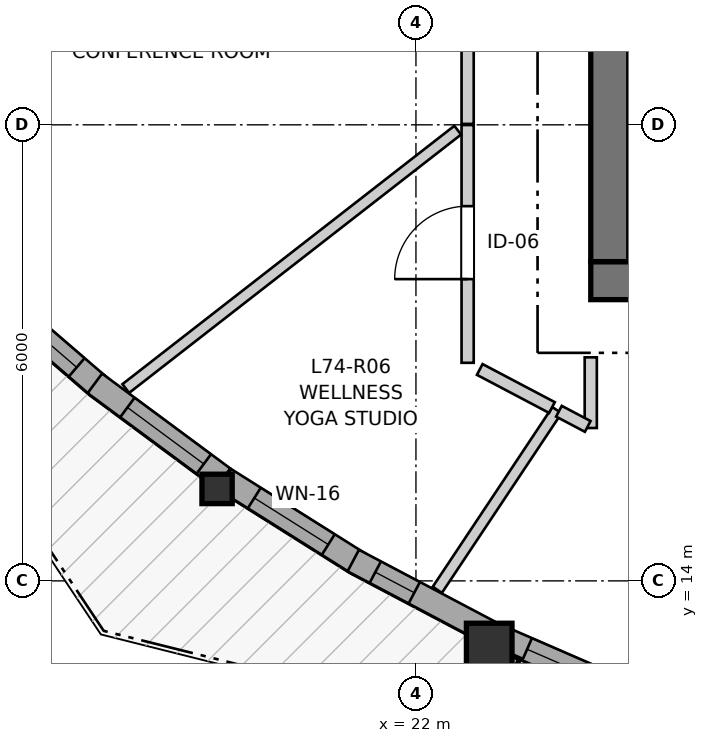
"""IFC4 building model, lengths in metres.
Left out: names, types, materials, properties, quantities, classifications, styles, units other than length and angle.
Written with IfcOpenShell. Run it as: python <this file> out.ifc"""

import sys

from ifc_helpers import new_model, si_unit, direction, frame, frame_2d, origin, origin_2d, place, context, subcontext, project, spatial, rectangle, i_section, extrude, source, transform, mapped, element, fill, save


model = new_model("IFC4")
c1 = context("Model", 3, precision=1e-05, world=origin(), true_north=direction((0.0, 1.0)))
c2 = subcontext(c1, "Body", "Model", "MODEL_VIEW")
j1 = project(units=[si_unit("LENGTHUNIT", "METRE"), si_unit("PLANEANGLEUNIT", "RADIAN")], contexts=[c1])
p1 = place(None, origin())
s1 = spatial("IfcSite", under=j1, at=p1, CompositionType="ELEMENT")
p2 = place(p1, origin())
s2 = spatial("IfcBuilding", under=s1, at=p2, CompositionType="ELEMENT")
p3 = place(p2, frame((0.0, 0.0, 246.8)))
s3 = spatial("IfcBuildingStorey", under=s2, at=p3, CompositionType="ELEMENT", Elevation=246.8)
p4 = place(p3, frame((24.3, 17.95, 0.0), z_axis=(0.0, 0.0, 1.0), x_axis=(1.0, 0.0, 0.0)))
e1 = element("IfcWall", 1, at=p4, inside=s3, PredefinedType="SHEAR", context=c2, shape_type="SweptSolid", body=[
    extrude(rectangle(XDim=12.1, YDim=0.5, at=frame_2d((6.05, 0.0))), origin(), (0.0, 0.0, 1.0), 2.96),
])
p5 = place(p3, frame((24.55, 33.8, 0.0), z_axis=(0.0, 0.0, 1.0), x_axis=(0.0, -1.0, 0.0)))
e2 = element("IfcWall", 2, at=p5, inside=s3, PredefinedType="SHEAR", context=c2, shape_type="SweptSolid", body=[
    extrude(rectangle(XDim=15.6, YDim=0.5, at=frame_2d((7.8, 0.0))), origin(), (0.0, 0.0, 1.0), 2.96),
])
p6 = place(p5, frame((7.05, 0.0, 0.0)))
e3 = element("IfcOpeningElement", 3, at=p6, cuts=e2, PredefinedType="OPENING", context=c2, shape_type="SweptSolid", body=[
    extrude(rectangle(XDim=1.5, YDim=2.15, at=frame_2d((0.75, 1.075))), frame((0.0, 0.26, 0.0), z_axis=(0.0, -1.0, 0.0), x_axis=(1.0, 0.0, 0.0)), (0.0, 0.0, 1.0), 0.52),
])
p7 = place(p5, frame((3.52, 0.0, 0.0)))
e4 = element("IfcOpeningElement", 4, at=p7, cuts=e2, PredefinedType="OPENING", context=c2, shape_type="SweptSolid", body=[
    extrude(rectangle(XDim=0.86, YDim=2.05, at=frame_2d((0.43, 1.025))), frame((0.0, 0.26, 0.0), z_axis=(0.0, -1.0, 0.0), x_axis=(1.0, 0.0, 0.0)), (0.0, 0.0, 1.0), 0.52),
])
p8 = place(p5, frame((11.22, 0.0, 0.0)))
e5 = element("IfcOpeningElement", 5, at=p8, cuts=e2, PredefinedType="OPENING", context=c2, shape_type="SweptSolid", body=[
    extrude(rectangle(XDim=0.86, YDim=2.05, at=frame_2d((0.43, 1.025))), frame((0.0, 0.26, 0.0), z_axis=(0.0, -1.0, 0.0), x_axis=(1.0, 0.0, 0.0)), (0.0, 0.0, 1.0), 0.52),
])
m1 = source(origin(), c2, "Body", "SweptSolid", [
    extrude(i_section(OverallWidth=0.398, OverallDepth=0.387, WebThickness=0.019, FlangeThickness=0.03, FilletRadius=0.015, at=origin_2d()), origin(), (0.0, 0.0, 1.0), 2.96),
])
p9 = place(p3, frame((19.383, 15.21, 0.0), z_axis=(0.0, 0.0, 1.0), x_axis=(1.0, 0.0, 0.0)))
e6 = element("IfcColumn", 6, at=p9, inside=s3, PredefinedType="PILASTER", context=c2, shape_type="MappedRepresentation", body=[
    mapped(m1, transform((0.0, 0.0, 0.0), x_axis=(1.0, 0.0, 0.0), y_axis=(0.0, 1.0, 0.0), z_axis=(0.0, 0.0, 1.0), scale=1.0)),
])
m2 = source(origin(), c2, "Body", "SweptSolid", [
    extrude(rectangle(XDim=0.6, YDim=0.6, at=origin_2d()), origin(), (0.0, 0.0, 1.0), 2.96),
])
p10 = place(p3, frame((22.964, 13.143, 0.0), z_axis=(0.0, 0.0, 1.0), x_axis=(1.0, 0.0, 0.0)))
e7 = element("IfcColumn", 7, at=p10, inside=s3, PredefinedType="COLUMN", context=c2, shape_type="MappedRepresentation", body=[
    mapped(m2, transform((0.0, 0.0, 0.0), x_axis=(1.0, 0.0, 0.0), y_axis=(0.0, 1.0, 0.0), z_axis=(0.0, 0.0, 1.0), scale=1.0)),
])
p11 = place(p3, frame((16.29, 17.884, 0.0), z_axis=(0.0, 0.0, 1.0), x_axis=(0.757405903716, -0.652944329186, 0.0)))
e8 = element("IfcWall", 8, at=p11, inside=s3, PredefinedType="SOLIDWALL", context=c2, shape_type="SweptSolid", body=[
    extrude(rectangle(XDim=2.052, YDim=0.32, at=frame_2d((1.026, 0.0))), origin(), (0.0, 0.0, 1.0), 2.58),
])
p12 = place(p11, frame((0.396, 0.0, 0.82)))
e9 = element("IfcOpeningElement", 9, at=p12, cuts=e8, PredefinedType="OPENING", context=c2, shape_type="SweptSolid", body=[
    extrude(rectangle(XDim=1.25, YDim=1.35, at=frame_2d((0.625, 0.675))), frame((0.0, 0.17, 0.0), z_axis=(0.0, -1.0, 0.0), x_axis=(1.0, 0.0, 0.0)), (0.0, 0.0, 1.0), 0.34),
])
p13 = place(p3, frame((17.775, 16.599, 0.0), z_axis=(0.0, 0.0, 1.0), x_axis=(0.803808524664, -0.594888103493, 0.0)))
e10 = element("IfcWall", 10, at=p13, inside=s3, PredefinedType="SOLIDWALL", context=c2, shape_type="SweptSolid", body=[
    extrude(rectangle(XDim=2.099, YDim=0.32, at=frame_2d((1.049, 0.0))), origin(), (0.0, 0.0, 1.0), 2.58),
])
p14 = place(p13, frame((0.533, 0.0, 0.82)))
e11 = element("IfcOpeningElement", 11, at=p14, cuts=e10, PredefinedType="OPENING", context=c2, shape_type="SweptSolid", body=[
    extrude(rectangle(XDim=1.25, YDim=1.35, at=frame_2d((0.625, 0.675))), frame((0.0, 0.17, 0.0), z_axis=(0.0, -1.0, 0.0), x_axis=(1.0, 0.0, 0.0)), (0.0, 0.0, 1.0), 0.34),
])
p15 = place(p3, frame((19.486, 15.335, 0.0), z_axis=(0.0, 0.0, 1.0), x_axis=(0.846377392327, -0.532583617621, 0.0)))
e12 = element("IfcWall", 12, at=p15, inside=s3, PredefinedType="SOLIDWALL", context=c2, shape_type="SweptSolid", body=[
    extrude(rectangle(XDim=2.087, YDim=0.32, at=frame_2d((1.043, 0.0))), origin(), (0.0, 0.0, 1.0), 2.58),
])
p16 = place(p15, frame((0.458, 0.0, 0.82)))
e13 = element("IfcOpeningElement", 13, at=p16, cuts=e12, PredefinedType="OPENING", context=c2, shape_type="SweptSolid", body=[
    extrude(rectangle(XDim=1.15, YDim=1.2, at=frame_2d((0.575, 0.6))), frame((0.0, 0.17, 0.0), z_axis=(0.0, -1.0, 0.0), x_axis=(1.0, 0.0, 0.0)), (0.0, 0.0, 1.0), 0.34),
])
p17 = place(p3, frame((21.175, 14.268, 0.0), z_axis=(0.0, 0.0, 1.0), x_axis=(0.88438197682, -0.466763879362, 0.0)))
e14 = element("IfcWall", 14, at=p17, inside=s3, PredefinedType="SOLIDWALL", context=c2, shape_type="SweptSolid", body=[
    extrude(rectangle(XDim=2.017, YDim=0.32, at=frame_2d((1.008, 0.0))), origin(), (0.0, 0.0, 1.0), 2.58),
])
p18 = place(p17, frame((0.327, 0.0, 0.82)))
e15 = element("IfcOpeningElement", 15, at=p18, cuts=e14, PredefinedType="OPENING", context=c2, shape_type="SweptSolid", body=[
    extrude(rectangle(XDim=0.58, YDim=1.35, at=frame_2d((0.29, 0.675))), frame((0.0, 0.17, 0.0), z_axis=(0.0, -1.0, 0.0), x_axis=(1.0, 0.0, 0.0)), (0.0, 0.0, 1.0), 0.34),
])
p19 = place(p3, frame((23.11, 13.254, 0.0), z_axis=(0.0, 0.0, 1.0), x_axis=(0.917071969608, -0.398721710671, 0.0)))
e16 = element("IfcWall", 16, at=p19, inside=s3, PredefinedType="SOLIDWALL", context=c2, shape_type="SweptSolid", body=[
    extrude(rectangle(XDim=2.029, YDim=0.32, at=frame_2d((1.014, 0.0))), origin(), (0.0, 0.0, 1.0), 2.58),
])
p20 = place(p19, frame((0.384, 0.0, 0.82)))
e17 = element("IfcOpeningElement", 17, at=p20, cuts=e16, PredefinedType="OPENING", context=c2, shape_type="SweptSolid", body=[
    extrude(rectangle(XDim=1.25, YDim=1.35, at=frame_2d((0.625, 0.675))), frame((0.0, 0.17, 0.0), z_axis=(0.0, -1.0, 0.0), x_axis=(1.0, 0.0, 0.0)), (0.0, 0.0, 1.0), 0.34),
])
p21 = place(p3, frame((22.68, 20.012, 0.0), z_axis=(0.0, 0.0, 1.0), x_axis=(0.0, 1.0, 0.0)))
e18 = element("IfcWall", 18, at=p21, inside=s3, PredefinedType="PARTITIONING", context=c2, shape_type="SweptSolid", body=[
    extrude(rectangle(XDim=4.138, YDim=0.16, at=frame_2d((2.069, 0.0))), origin(), (0.0, 0.0, 1.0), 2.96),
])
p22 = place(p21, frame((1.466, 0.0, 0.0)))
e19 = element("IfcOpeningElement", 19, at=p22, cuts=e18, PredefinedType="OPENING", context=c2, shape_type="SweptSolid", body=[
    extrude(rectangle(XDim=1.3, YDim=2.1, at=frame_2d((0.65, 1.05))), frame((0.0, 0.09, 0.0), z_axis=(0.0, -1.0, 0.0), x_axis=(1.0, 0.0, 0.0)), (0.0, 0.0, 1.0), 0.18),
])
p23 = place(p3, frame((22.68, 16.869, 0.0), z_axis=(0.0, 0.0, 1.0), x_axis=(0.0, 1.0, 0.0)))
e20 = element("IfcWall", 20, at=p23, inside=s3, PredefinedType="PARTITIONING", context=c2, shape_type="SweptSolid", body=[
    extrude(rectangle(XDim=3.128, YDim=0.16, at=frame_2d((1.564, 0.0))), origin(), (0.0, 0.0, 1.0), 2.96),
])
p24 = place(p23, frame((1.101, 0.0, 0.0)))
e21 = element("IfcOpeningElement", 21, at=p24, cuts=e20, PredefinedType="OPENING", context=c2, shape_type="SweptSolid", body=[
    extrude(rectangle(XDim=0.96, YDim=2.1, at=frame_2d((0.48, 1.05))), frame((0.0, 0.09, 0.0), z_axis=(0.0, -1.0, 0.0), x_axis=(1.0, 0.0, 0.0)), (0.0, 0.0, 1.0), 0.18),
])
p25 = place(p3, frame((18.182, 16.531, 0.0), z_axis=(0.0, 0.0, 1.0), x_axis=(0.789162127136, 0.614184937209, 0.0)))
e22 = element("IfcWall", 22, at=p25, inside=s3, PredefinedType="PARTITIONING", context=c2, shape_type="SweptSolid", body=[
    extrude(rectangle(XDim=5.534, YDim=0.145, at=frame_2d((2.767, 0.0))), origin(), (0.0, 0.0, 1.0), 2.96),
])
p26 = place(p3, frame((22.281, 13.882, 0.0), z_axis=(0.0, 0.0, 1.0), x_axis=(0.554204156683, 0.832380773874, 0.0)))
e23 = element("IfcWall", 23, at=p26, inside=s3, PredefinedType="PARTITIONING", context=c2, shape_type="SweptSolid", body=[
    extrude(rectangle(XDim=2.84, YDim=0.145, at=frame_2d((1.42, 0.0))), origin(), (0.0, 0.0, 1.0), 2.96),
])
p27 = place(p3, frame((22.839, 16.781, 0.0), z_axis=(0.0, 0.0, 1.0), x_axis=(0.884533287542, -0.466477076853, 0.0)))
e24 = element("IfcWall", 24, at=p27, inside=s3, PredefinedType="PARTITIONING", context=c2, shape_type="SweptSolid", body=[
    extrude(rectangle(XDim=1.074, YDim=0.16, at=frame_2d((0.537, 0.0))), origin(), (0.0, 0.0, 1.0), 2.96),
])
p28 = place(p3, frame((24.3, 16.011, 0.0), z_axis=(0.0, 0.0, 1.0), x_axis=(0.0, 1.0, 0.0)))
e25 = element("IfcWall", 25, at=p28, inside=s3, PredefinedType="PARTITIONING", context=c2, shape_type="SweptSolid", body=[
    extrude(rectangle(XDim=0.93, YDim=0.16, at=frame_2d((0.465, 0.0))), origin(), (0.0, 0.0, 1.0), 2.96),
])
p29 = place(p3, frame((23.881, 16.232, 0.0), z_axis=(0.0, 0.0, 1.0), x_axis=(0.884769878191, -0.466028177953, 0.0)))
e26 = element("IfcWall", 26, at=p29, inside=s3, PredefinedType="PARTITIONING", context=c2, shape_type="SweptSolid", body=[
    extrude(rectangle(XDim=0.428, YDim=0.16, at=frame_2d((0.214, 0.0))), origin(), (0.0, 0.0, 1.0), 2.96),
])
m3 = source(origin(), c2, "Body", "SweptSolid", [
    extrude(rectangle(XDim=1.25, YDim=1.35, at=frame_2d((0.625, 0.675))), frame((0.0, 0.03, 0.0), z_axis=(0.0, -1.0, 0.0), x_axis=(1.0, 0.0, 0.0)), (0.0, 0.0, 1.0), 0.06),
])
p30 = place(p12, origin())
e27 = element("IfcWindow", 27, at=p30, inside=s3, PartitioningType="SINGLE_PANEL", PredefinedType="WINDOW", context=c2, shape_type="MappedRepresentation", body=[
    mapped(m3, transform((0.0, 0.0, 0.0), x_axis=(1.0, 0.0, 0.0), y_axis=(0.0, 1.0, 0.0), z_axis=(0.0, 0.0, 1.0), scale=1.0)),
])
fill(e9, e27)
p31 = place(p14, origin())
e28 = element("IfcWindow", 28, at=p31, inside=s3, PartitioningType="SINGLE_PANEL", PredefinedType="WINDOW", context=c2, shape_type="MappedRepresentation", body=[
    mapped(m3, transform((0.0, 0.0, 0.0), x_axis=(1.0, 0.0, 0.0), y_axis=(0.0, 1.0, 0.0), z_axis=(0.0, 0.0, 1.0), scale=1.0)),
])
fill(e11, e28)
m4 = source(origin(), c2, "Body", "SweptSolid", [
    extrude(rectangle(XDim=1.15, YDim=1.2, at=frame_2d((0.575, 0.6))), frame((0.0, 0.03, 0.0), z_axis=(0.0, -1.0, 0.0), x_axis=(1.0, 0.0, 0.0)), (0.0, 0.0, 1.0), 0.06),
])
p32 = place(p16, origin())
e29 = element("IfcWindow", 29, at=p32, inside=s3, PartitioningType="SINGLE_PANEL", PredefinedType="WINDOW", context=c2, shape_type="MappedRepresentation", body=[
    mapped(m4, transform((0.0, 0.0, 0.0), x_axis=(1.0, 0.0, 0.0), y_axis=(0.0, 1.0, 0.0), z_axis=(0.0, 0.0, 1.0), scale=1.0)),
])
fill(e13, e29)
m5 = source(origin(), c2, "Body", "SweptSolid", [
    extrude(rectangle(XDim=0.58, YDim=1.35, at=frame_2d((0.29, 0.675))), frame((0.0, 0.03, 0.0), z_axis=(0.0, -1.0, 0.0), x_axis=(1.0, 0.0, 0.0)), (0.0, 0.0, 1.0), 0.06),
])
p33 = place(p18, origin())
e30 = element("IfcWindow", 30, at=p33, inside=s3, PartitioningType="SINGLE_PANEL", PredefinedType="WINDOW", context=c2, shape_type="MappedRepresentation", body=[
    mapped(m5, transform((0.0, 0.0, 0.0), x_axis=(1.0, 0.0, 0.0), y_axis=(0.0, 1.0, 0.0), z_axis=(0.0, 0.0, 1.0), scale=1.0)),
])
fill(e15, e30)
p34 = place(p20, origin())
e31 = element("IfcWindow", 31, at=p34, inside=s3, PartitioningType="SINGLE_PANEL", PredefinedType="WINDOW", context=c2, shape_type="MappedRepresentation", body=[
    mapped(m3, transform((0.0, 0.0, 0.0), x_axis=(1.0, 0.0, 0.0), y_axis=(0.0, 1.0, 0.0), z_axis=(0.0, 0.0, 1.0), scale=1.0)),
])
fill(e17, e31)
m6 = source(origin(), c2, "Body", "SweptSolid", [
    extrude(rectangle(XDim=0.96, YDim=2.1, at=frame_2d((0.48, 1.05))), frame((0.0, 0.025, 0.0), z_axis=(0.0, -1.0, 0.0), x_axis=(1.0, 0.0, 0.0)), (0.0, 0.0, 1.0), 0.05),
])
p35 = place(p24, origin())
e32 = element("IfcDoor", 32, at=p35, inside=s3, OperationType="SINGLE_SWING_LEFT", PredefinedType="DOOR", context=c2, shape_type="MappedRepresentation", body=[
    mapped(m6, transform((0.0, 0.0, 0.0), x_axis=(1.0, 0.0, 0.0), y_axis=(0.0, 1.0, 0.0), z_axis=(0.0, 0.0, 1.0), scale=1.0)),
])
fill(e21, e32)
save(model, sys.argv[1])
